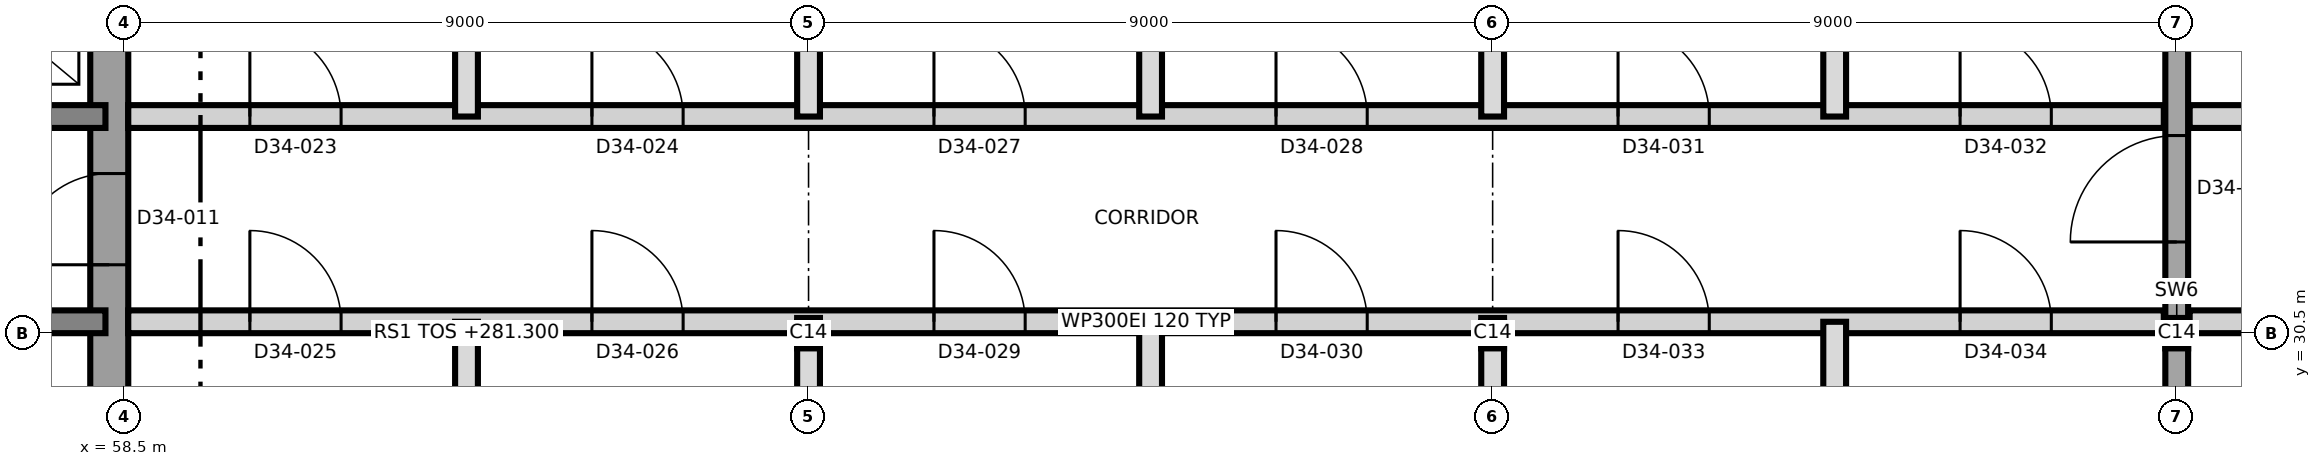
"""IFC4 building model, lengths in metres.
Left out: names, types, materials, properties, quantities, classifications, styles, units other than length and angle.
Written with IfcOpenShell. Run it as: python <this file> out.ifc"""

import sys

from ifc_helpers import new_model, si_unit, direction, frame, frame_2d, origin, origin_2d, place, context, subcontext, project, spatial, polyline, rectangle, i_section, outline, extrude, element, fill, save


model = new_model("IFC4")
c1 = context("Model", 3, precision=1e-05, world=origin(), true_north=direction((0.0, 1.0)))
c2 = subcontext(c1, "Body", "Model", "MODEL_VIEW")
j1 = project(units=[si_unit("LENGTHUNIT", "METRE"), si_unit("PLANEANGLEUNIT", "RADIAN")], contexts=[c1])
p1 = place(None, origin())
s1 = spatial("IfcSite", under=j1, at=p1, CompositionType="ELEMENT")
p2 = place(p1, origin())
s2 = spatial("IfcBuilding", under=s1, at=p2, CompositionType="ELEMENT")
p3 = place(p2, frame((0.0, 0.0, 281.3)))
s3 = spatial("IfcBuildingStorey", under=s2, at=p3, CompositionType="ELEMENT", Elevation=281.3)
p4 = place(p3, frame((58.3, 21.25, 0.0), z_axis=(0.0, 0.0, 1.0), x_axis=(0.0, 1.0, 0.0)))
e1 = element("IfcWall", 1, at=p4, inside=s3, PredefinedType="SHEAR", context=c2, shape_type="SweptSolid", body=[
    extrude(outline(polyline([(0.0, 0.0), (18.5, 0.0), (18.5, 2.12), (15.441, 4.2), (0.0, 4.2), (0.0, 0.0)])), frame((0.0, 0.25, 0.0), z_axis=(0.0, -1.0, 0.0), x_axis=(1.0, 0.0, 0.0)), (0.0, 0.0, 1.0), 0.5),
])
p5 = place(p4, frame((10.15, 0.0, 0.0)))
e2 = element("IfcOpeningElement", 2, at=p5, cuts=e1, PredefinedType="OPENING", context=c2, shape_type="SweptSolid", body=[
    extrude(rectangle(XDim=1.2, YDim=2.1, at=frame_2d((0.6, 1.05))), frame((0.0, 0.26, 0.0), z_axis=(0.0, -1.0, 0.0), x_axis=(1.0, 0.0, 0.0)), (0.0, 0.0, 1.0), 0.52),
])
p6 = place(p3, frame((31.75, 30.65, 0.0), z_axis=(0.0, 0.0, 1.0), x_axis=(1.0, 0.0, 0.0)))
e3 = element("IfcWall", 3, at=p6, inside=s3, PredefinedType="SHEAR", context=c2, shape_type="SweptSolid", body=[
    extrude(rectangle(XDim=26.5, YDim=0.3, at=frame_2d((13.25, 0.0))), origin(), (0.0, 0.0, 1.0), 4.2),
])
p7 = place(p6, frame((24.75, 0.0, 0.0)))
e4 = element("IfcOpeningElement", 4, at=p7, cuts=e3, PredefinedType="OPENING", context=c2, shape_type="SweptSolid", body=[
    extrude(rectangle(XDim=1.0, YDim=2.1, at=frame_2d((0.5, 1.05))), frame((0.0, 0.16, 0.0), z_axis=(0.0, -1.0, 0.0), x_axis=(1.0, 0.0, 0.0)), (0.0, 0.0, 1.0), 0.32),
])
p8 = place(p6, frame((4.05, 0.0, 0.0)))
e5 = element("IfcOpeningElement", 5, at=p8, cuts=e3, PredefinedType="OPENING", context=c2, shape_type="SweptSolid", body=[
    extrude(rectangle(XDim=1.0, YDim=2.1, at=frame_2d((0.5, 1.05))), frame((0.0, 0.16, 0.0), z_axis=(0.0, -1.0, 0.0), x_axis=(1.0, 0.0, 0.0)), (0.0, 0.0, 1.0), 0.32),
])
p9 = place(p6, frame((11.55, 0.0, 0.0)))
e6 = element("IfcOpeningElement", 6, at=p9, cuts=e3, PredefinedType="OPENING", context=c2, shape_type="SweptSolid", body=[
    extrude(rectangle(XDim=1.0, YDim=2.1, at=frame_2d((0.5, 1.05))), frame((0.0, 0.16, 0.0), z_axis=(0.0, -1.0, 0.0), x_axis=(1.0, 0.0, 0.0)), (0.0, 0.0, 1.0), 0.32),
])
p10 = place(p3, frame((31.75, 33.35, 0.0), z_axis=(0.0, 0.0, 1.0), x_axis=(1.0, 0.0, 0.0)))
e7 = element("IfcWall", 7, at=p10, inside=s3, PredefinedType="SHEAR", context=c2, shape_type="SweptSolid", body=[
    extrude(rectangle(XDim=26.5, YDim=0.3, at=frame_2d((13.25, 0.0))), origin(), (0.0, 0.0, 1.0), 4.2),
])
p11 = place(p10, frame((13.9, 0.0, 0.0)))
e8 = element("IfcOpeningElement", 8, at=p11, cuts=e7, PredefinedType="OPENING", context=c2, shape_type="SweptSolid", body=[
    extrude(rectangle(XDim=1.4, YDim=2.1, at=frame_2d((0.7, 1.05))), frame((0.0, 0.16, 0.0), z_axis=(0.0, -1.0, 0.0), x_axis=(1.0, 0.0, 0.0)), (0.0, 0.0, 1.0), 0.32),
])
p12 = place(p10, frame((5.375, 0.0, 0.0)))
e9 = element("IfcOpeningElement", 9, at=p12, cuts=e7, PredefinedType="OPENING", context=c2, shape_type="SweptSolid", body=[
    extrude(rectangle(XDim=1.2, YDim=2.1, at=frame_2d((0.6, 1.05))), frame((0.0, 0.16, 0.0), z_axis=(0.0, -1.0, 0.0), x_axis=(1.0, 0.0, 0.0)), (0.0, 0.0, 1.0), 0.32),
])
p13 = place(p10, frame((19.925, 0.0, 0.0)))
e10 = element("IfcOpeningElement", 10, at=p13, cuts=e7, PredefinedType="OPENING", context=c2, shape_type="SweptSolid", body=[
    extrude(rectangle(XDim=1.2, YDim=2.1, at=frame_2d((0.6, 1.05))), frame((0.0, 0.16, 0.0), z_axis=(0.0, -1.0, 0.0), x_axis=(1.0, 0.0, 0.0)), (0.0, 0.0, 1.0), 0.32),
])
p14 = place(p10, frame((9.8, 0.0, 0.0)))
e11 = element("IfcOpeningElement", 11, at=p14, cuts=e7, PredefinedType="OPENING", context=c2, shape_type="SweptSolid", body=[
    extrude(rectangle(XDim=0.9, YDim=2.1, at=frame_2d((0.45, 1.05))), frame((0.0, 0.16, 0.0), z_axis=(0.0, -1.0, 0.0), x_axis=(1.0, 0.0, 0.0)), (0.0, 0.0, 1.0), 0.32),
])
p15 = place(p3, frame((85.5, 20.35, 0.0), z_axis=(0.0, 0.0, 1.0), x_axis=(0.0, 1.0, 0.0)))
e12 = element("IfcWall", 12, at=p15, inside=s3, PredefinedType="SHEAR", context=c2, shape_type="SweptSolid", body=[
    extrude(outline(polyline([(0.0, 0.0), (20.3, 0.0), (20.3, 1.508), (16.341, 4.2), (0.0, 4.2), (0.0, 0.0)])), frame((0.0, 0.15, 0.0), z_axis=(0.0, -1.0, 0.0), x_axis=(1.0, 0.0, 0.0)), (0.0, 0.0, 1.0), 0.3),
])
p16 = place(p15, frame((11.35, 0.0, 0.0)))
e13 = element("IfcOpeningElement", 13, at=p16, cuts=e12, PredefinedType="OPENING", context=c2, shape_type="SweptSolid", body=[
    extrude(rectangle(XDim=1.4, YDim=2.1, at=frame_2d((0.7, 1.05))), frame((0.0, 0.16, 0.0), z_axis=(0.0, -1.0, 0.0), x_axis=(1.0, 0.0, 0.0)), (0.0, 0.0, 1.0), 0.32),
])
for number, where, z_axis, x_axis in (
    (14, (67.5, 30.5, 0.0), (0.0, 0.0, 1.0), (1.0, 0.0, 0.0)),
    (15, (76.5, 30.5, 0.0), (0.0, 0.0, 1.0), (1.0, 0.0, 0.0)),
    (16, (85.5, 30.5, 0.0), (0.0, 0.0, 1.0), (1.0, 0.0, 0.0)),
):
    element("IfcColumn", number, at=place(p3, frame(where, z_axis=z_axis, x_axis=x_axis)), inside=s3, PredefinedType="COLUMN", context=c2, shape_type="SweptSolid", body=[
        extrude(i_section(OverallWidth=0.3, OverallDepth=0.4, WebThickness=0.013, FlangeThickness=0.024, FilletRadius=0.027, at=origin_2d()), origin(), (0.0, 0.0, 1.0), 4.2),
    ])
p17 = place(p3, frame((58.55, 30.65, 0.0), z_axis=(0.0, 0.0, 1.0), x_axis=(1.0, 0.0, 0.0)))
e17 = element("IfcWall", 17, at=p17, inside=s3, PredefinedType="PARTITIONING", context=c2, shape_type="SweptSolid", body=[
    extrude(rectangle(XDim=26.78, YDim=0.3, at=frame_2d((13.39, 0.0))), origin(), (0.0, 0.0, 1.0), 3.9),
])
p18 = place(p17, frame((1.6, 0.0, 0.0)))
e18 = element("IfcOpeningElement", 18, at=p18, cuts=e17, PredefinedType="OPENING", context=c2, shape_type="SweptSolid", body=[
    extrude(rectangle(XDim=1.2, YDim=2.1, at=frame_2d((0.6, 1.05))), frame((0.0, 0.16, 0.0), z_axis=(0.0, -1.0, 0.0), x_axis=(1.0, 0.0, 0.0)), (0.0, 0.0, 1.0), 0.32),
])
p19 = place(p17, frame((6.1, 0.0, 0.0)))
e19 = element("IfcOpeningElement", 19, at=p19, cuts=e17, PredefinedType="OPENING", context=c2, shape_type="SweptSolid", body=[
    extrude(rectangle(XDim=1.2, YDim=2.1, at=frame_2d((0.6, 1.05))), frame((0.0, 0.16, 0.0), z_axis=(0.0, -1.0, 0.0), x_axis=(1.0, 0.0, 0.0)), (0.0, 0.0, 1.0), 0.32),
])
p20 = place(p17, frame((10.6, 0.0, 0.0)))
e20 = element("IfcOpeningElement", 20, at=p20, cuts=e17, PredefinedType="OPENING", context=c2, shape_type="SweptSolid", body=[
    extrude(rectangle(XDim=1.2, YDim=2.1, at=frame_2d((0.6, 1.05))), frame((0.0, 0.16, 0.0), z_axis=(0.0, -1.0, 0.0), x_axis=(1.0, 0.0, 0.0)), (0.0, 0.0, 1.0), 0.32),
])
p21 = place(p17, frame((15.1, 0.0, 0.0)))
e21 = element("IfcOpeningElement", 21, at=p21, cuts=e17, PredefinedType="OPENING", context=c2, shape_type="SweptSolid", body=[
    extrude(rectangle(XDim=1.2, YDim=2.1, at=frame_2d((0.6, 1.05))), frame((0.0, 0.16, 0.0), z_axis=(0.0, -1.0, 0.0), x_axis=(1.0, 0.0, 0.0)), (0.0, 0.0, 1.0), 0.32),
])
p22 = place(p17, frame((19.6, 0.0, 0.0)))
e22 = element("IfcOpeningElement", 22, at=p22, cuts=e17, PredefinedType="OPENING", context=c2, shape_type="SweptSolid", body=[
    extrude(rectangle(XDim=1.2, YDim=2.1, at=frame_2d((0.6, 1.05))), frame((0.0, 0.16, 0.0), z_axis=(0.0, -1.0, 0.0), x_axis=(1.0, 0.0, 0.0)), (0.0, 0.0, 1.0), 0.32),
])
p23 = place(p17, frame((24.1, 0.0, 0.0)))
e23 = element("IfcOpeningElement", 23, at=p23, cuts=e17, PredefinedType="OPENING", context=c2, shape_type="SweptSolid", body=[
    extrude(rectangle(XDim=1.2, YDim=2.1, at=frame_2d((0.6, 1.05))), frame((0.0, 0.16, 0.0), z_axis=(0.0, -1.0, 0.0), x_axis=(1.0, 0.0, 0.0)), (0.0, 0.0, 1.0), 0.32),
])
p24 = place(p3, frame((85.67, 30.65, 0.0), z_axis=(0.0, 0.0, 1.0), x_axis=(1.0, 0.0, 0.0)))
e24 = element("IfcWall", 24, at=p24, inside=s3, PredefinedType="PARTITIONING", context=c2, shape_type="SweptSolid", body=[
    extrude(rectangle(XDim=9.58, YDim=0.3, at=frame_2d((4.79, 0.0))), origin(), (0.0, 0.0, 1.0), 3.9),
])
p25 = place(p24, frame((2.23, 0.0, 0.0)))
e25 = element("IfcOpeningElement", 25, at=p25, cuts=e24, PredefinedType="OPENING", context=c2, shape_type="SweptSolid", body=[
    extrude(rectangle(XDim=0.9, YDim=2.1, at=frame_2d((0.45, 1.05))), frame((0.0, 0.16, 0.0), z_axis=(0.0, -1.0, 0.0), x_axis=(1.0, 0.0, 0.0)), (0.0, 0.0, 1.0), 0.32),
])
p26 = place(p24, frame((5.63, 0.0, 0.0)))
e26 = element("IfcOpeningElement", 26, at=p26, cuts=e24, PredefinedType="OPENING", context=c2, shape_type="SweptSolid", body=[
    extrude(rectangle(XDim=1.0, YDim=2.1, at=frame_2d((0.5, 1.05))), frame((0.0, 0.16, 0.0), z_axis=(0.0, -1.0, 0.0), x_axis=(1.0, 0.0, 0.0)), (0.0, 0.0, 1.0), 0.32),
])
p27 = place(p3, frame((58.55, 33.35, 0.0), z_axis=(0.0, 0.0, 1.0), x_axis=(1.0, 0.0, 0.0)))
e27 = element("IfcWall", 27, at=p27, inside=s3, PredefinedType="PARTITIONING", context=c2, shape_type="SweptSolid", body=[
    extrude(rectangle(XDim=26.78, YDim=0.3, at=frame_2d((13.39, 0.0))), origin(), (0.0, 0.0, 1.0), 3.9),
])
p28 = place(p27, frame((1.6, 0.0, 0.0)))
e28 = element("IfcOpeningElement", 28, at=p28, cuts=e27, PredefinedType="OPENING", context=c2, shape_type="SweptSolid", body=[
    extrude(rectangle(XDim=1.2, YDim=2.1, at=frame_2d((0.6, 1.05))), frame((0.0, 0.16, 0.0), z_axis=(0.0, -1.0, 0.0), x_axis=(1.0, 0.0, 0.0)), (0.0, 0.0, 1.0), 0.32),
])
p29 = place(p27, frame((6.1, 0.0, 0.0)))
e29 = element("IfcOpeningElement", 29, at=p29, cuts=e27, PredefinedType="OPENING", context=c2, shape_type="SweptSolid", body=[
    extrude(rectangle(XDim=1.2, YDim=2.1, at=frame_2d((0.6, 1.05))), frame((0.0, 0.16, 0.0), z_axis=(0.0, -1.0, 0.0), x_axis=(1.0, 0.0, 0.0)), (0.0, 0.0, 1.0), 0.32),
])
p30 = place(p27, frame((10.6, 0.0, 0.0)))
e30 = element("IfcOpeningElement", 30, at=p30, cuts=e27, PredefinedType="OPENING", context=c2, shape_type="SweptSolid", body=[
    extrude(rectangle(XDim=1.2, YDim=2.1, at=frame_2d((0.6, 1.05))), frame((0.0, 0.16, 0.0), z_axis=(0.0, -1.0, 0.0), x_axis=(1.0, 0.0, 0.0)), (0.0, 0.0, 1.0), 0.32),
])
p31 = place(p27, frame((15.1, 0.0, 0.0)))
e31 = element("IfcOpeningElement", 31, at=p31, cuts=e27, PredefinedType="OPENING", context=c2, shape_type="SweptSolid", body=[
    extrude(rectangle(XDim=1.2, YDim=2.1, at=frame_2d((0.6, 1.05))), frame((0.0, 0.16, 0.0), z_axis=(0.0, -1.0, 0.0), x_axis=(1.0, 0.0, 0.0)), (0.0, 0.0, 1.0), 0.32),
])
p32 = place(p27, frame((19.6, 0.0, 0.0)))
e32 = element("IfcOpeningElement", 32, at=p32, cuts=e27, PredefinedType="OPENING", context=c2, shape_type="SweptSolid", body=[
    extrude(rectangle(XDim=1.2, YDim=2.1, at=frame_2d((0.6, 1.05))), frame((0.0, 0.16, 0.0), z_axis=(0.0, -1.0, 0.0), x_axis=(1.0, 0.0, 0.0)), (0.0, 0.0, 1.0), 0.32),
])
p33 = place(p27, frame((24.1, 0.0, 0.0)))
e33 = element("IfcOpeningElement", 33, at=p33, cuts=e27, PredefinedType="OPENING", context=c2, shape_type="SweptSolid", body=[
    extrude(rectangle(XDim=1.2, YDim=2.1, at=frame_2d((0.6, 1.05))), frame((0.0, 0.16, 0.0), z_axis=(0.0, -1.0, 0.0), x_axis=(1.0, 0.0, 0.0)), (0.0, 0.0, 1.0), 0.32),
])
p34 = place(p3, frame((85.67, 33.35, 0.0), z_axis=(0.0, 0.0, 1.0), x_axis=(1.0, 0.0, 0.0)))
e34 = element("IfcWall", 34, at=p34, inside=s3, PredefinedType="PARTITIONING", context=c2, shape_type="SweptSolid", body=[
    extrude(rectangle(XDim=9.705, YDim=0.3, at=frame_2d((4.853, 0.0))), origin(), (0.0, 0.0, 1.0), 3.9),
])
p35 = place(p34, frame((1.83, 0.0, 0.0)))
e35 = element("IfcOpeningElement", 35, at=p35, cuts=e34, PredefinedType="OPENING", context=c2, shape_type="SweptSolid", body=[
    extrude(rectangle(XDim=1.0, YDim=2.1, at=frame_2d((0.5, 1.05))), frame((0.0, 0.16, 0.0), z_axis=(0.0, -1.0, 0.0), x_axis=(1.0, 0.0, 0.0)), (0.0, 0.0, 1.0), 0.32),
])
p36 = place(p34, frame((5.63, 0.0, 0.0)))
e36 = element("IfcOpeningElement", 36, at=p36, cuts=e34, PredefinedType="OPENING", context=c2, shape_type="SweptSolid", body=[
    extrude(rectangle(XDim=1.0, YDim=2.1, at=frame_2d((0.5, 1.05))), frame((0.0, 0.16, 0.0), z_axis=(0.0, -1.0, 0.0), x_axis=(1.0, 0.0, 0.0)), (0.0, 0.0, 1.0), 0.32),
])
p37 = place(p3, frame((63.0, 20.17, 0.0), z_axis=(0.0, 0.0, 1.0), x_axis=(0.0, 1.0, 0.0)))
e37 = element("IfcWall", 37, at=p37, inside=s3, PredefinedType="PARTITIONING", context=c2, shape_type="SweptSolid", body=[
    extrude(rectangle(XDim=10.48, YDim=0.3, at=frame_2d((5.24, 0.0))), origin(), (0.0, 0.0, 1.0), 3.9),
])
p38 = place(p3, frame((63.0, 33.35, 0.0), z_axis=(0.0, 0.0, 1.0), x_axis=(0.0, 1.0, 0.0)))
e38 = element("IfcWall", 38, at=p38, inside=s3, PredefinedType="PARTITIONING", context=c2, shape_type="SweptSolid", body=[
    extrude(rectangle(XDim=5.75, YDim=0.3, at=frame_2d((2.875, 0.0))), origin(), (0.0, 0.0, 1.0), 3.85),
])
p39 = place(p3, frame((67.5, 20.17, 0.0), z_axis=(0.0, 0.0, 1.0), x_axis=(0.0, 1.0, 0.0)))
e39 = element("IfcWall", 39, at=p39, inside=s3, PredefinedType="PARTITIONING", context=c2, shape_type="SweptSolid", body=[
    extrude(rectangle(XDim=10.48, YDim=0.3, at=frame_2d((5.24, 0.0))), origin(), (0.0, 0.0, 1.0), 3.9),
])
p40 = place(p3, frame((67.5, 33.35, 0.0), z_axis=(0.0, 0.0, 1.0), x_axis=(0.0, 1.0, 0.0)))
e40 = element("IfcWall", 40, at=p40, inside=s3, PredefinedType="PARTITIONING", context=c2, shape_type="SweptSolid", body=[
    extrude(rectangle(XDim=5.75, YDim=0.3, at=frame_2d((2.875, 0.0))), origin(), (0.0, 0.0, 1.0), 3.85),
])
p41 = place(p3, frame((72.0, 20.17, 0.0), z_axis=(0.0, 0.0, 1.0), x_axis=(0.0, 1.0, 0.0)))
e41 = element("IfcWall", 41, at=p41, inside=s3, PredefinedType="PARTITIONING", context=c2, shape_type="SweptSolid", body=[
    extrude(rectangle(XDim=10.48, YDim=0.3, at=frame_2d((5.24, 0.0))), origin(), (0.0, 0.0, 1.0), 3.9),
])
p42 = place(p3, frame((72.0, 33.35, 0.0), z_axis=(0.0, 0.0, 1.0), x_axis=(0.0, 1.0, 0.0)))
e42 = element("IfcWall", 42, at=p42, inside=s3, PredefinedType="PARTITIONING", context=c2, shape_type="SweptSolid", body=[
    extrude(rectangle(XDim=5.75, YDim=0.3, at=frame_2d((2.875, 0.0))), origin(), (0.0, 0.0, 1.0), 3.85),
])
p43 = place(p3, frame((76.5, 20.17, 0.0), z_axis=(0.0, 0.0, 1.0), x_axis=(0.0, 1.0, 0.0)))
e43 = element("IfcWall", 43, at=p43, inside=s3, PredefinedType="PARTITIONING", context=c2, shape_type="SweptSolid", body=[
    extrude(rectangle(XDim=10.48, YDim=0.3, at=frame_2d((5.24, 0.0))), origin(), (0.0, 0.0, 1.0), 3.9),
])
p44 = place(p3, frame((76.5, 33.35, 0.0), z_axis=(0.0, 0.0, 1.0), x_axis=(0.0, 1.0, 0.0)))
e44 = element("IfcWall", 44, at=p44, inside=s3, PredefinedType="PARTITIONING", context=c2, shape_type="SweptSolid", body=[
    extrude(rectangle(XDim=5.75, YDim=0.3, at=frame_2d((2.875, 0.0))), origin(), (0.0, 0.0, 1.0), 3.85),
])
p45 = place(p3, frame((81.0, 20.17, 0.0), z_axis=(0.0, 0.0, 1.0), x_axis=(0.0, 1.0, 0.0)))
e45 = element("IfcWall", 45, at=p45, inside=s3, PredefinedType="PARTITIONING", context=c2, shape_type="SweptSolid", body=[
    extrude(rectangle(XDim=10.48, YDim=0.3, at=frame_2d((5.24, 0.0))), origin(), (0.0, 0.0, 1.0), 3.9),
])
p46 = place(p3, frame((81.0, 33.35, 0.0), z_axis=(0.0, 0.0, 1.0), x_axis=(0.0, 1.0, 0.0)))
e46 = element("IfcWall", 46, at=p46, inside=s3, PredefinedType="PARTITIONING", context=c2, shape_type="SweptSolid", body=[
    extrude(rectangle(XDim=5.75, YDim=0.3, at=frame_2d((2.875, 0.0))), origin(), (0.0, 0.0, 1.0), 3.85),
])
p47 = place(p5, origin())
e47 = element("IfcDoor", 47, at=p47, inside=s3, OperationType="SINGLE_SWING_LEFT", PredefinedType="DOOR", context=c2, shape_type="SweptSolid", body=[
    extrude(rectangle(XDim=1.2, YDim=2.1, at=frame_2d((0.6, 1.05))), frame((0.0, 0.025, 0.0), z_axis=(0.0, -1.0, 0.0), x_axis=(1.0, 0.0, 0.0)), (0.0, 0.0, 1.0), 0.05),
])
fill(e2, e47)
p48 = place(p28, origin())
e48 = element("IfcDoor", 48, at=p48, inside=s3, OperationType="SINGLE_SWING_LEFT", PredefinedType="DOOR", context=c2, shape_type="SweptSolid", body=[
    extrude(rectangle(XDim=1.2, YDim=2.1, at=frame_2d((0.6, 1.05))), frame((0.0, 0.025, 0.0), z_axis=(0.0, -1.0, 0.0), x_axis=(1.0, 0.0, 0.0)), (0.0, 0.0, 1.0), 0.05),
])
fill(e28, e48)
p49 = place(p29, origin())
e49 = element("IfcDoor", 49, at=p49, inside=s3, OperationType="SINGLE_SWING_LEFT", PredefinedType="DOOR", context=c2, shape_type="SweptSolid", body=[
    extrude(rectangle(XDim=1.2, YDim=2.1, at=frame_2d((0.6, 1.05))), frame((0.0, 0.025, 0.0), z_axis=(0.0, -1.0, 0.0), x_axis=(1.0, 0.0, 0.0)), (0.0, 0.0, 1.0), 0.05),
])
fill(e29, e49)
p50 = place(p18, origin())
e50 = element("IfcDoor", 50, at=p50, inside=s3, OperationType="SINGLE_SWING_RIGHT", PredefinedType="DOOR", context=c2, shape_type="SweptSolid", body=[
    extrude(rectangle(XDim=1.2, YDim=2.1, at=frame_2d((0.6, 1.05))), frame((0.0, 0.025, 0.0), z_axis=(0.0, -1.0, 0.0), x_axis=(1.0, 0.0, 0.0)), (0.0, 0.0, 1.0), 0.05),
])
fill(e18, e50)
p51 = place(p19, origin())
e51 = element("IfcDoor", 51, at=p51, inside=s3, OperationType="SINGLE_SWING_LEFT", PredefinedType="DOOR", context=c2, shape_type="SweptSolid", body=[
    extrude(rectangle(XDim=1.2, YDim=2.1, at=frame_2d((0.6, 1.05))), frame((0.0, 0.025, 0.0), z_axis=(0.0, -1.0, 0.0), x_axis=(1.0, 0.0, 0.0)), (0.0, 0.0, 1.0), 0.05),
])
fill(e19, e51)
p52 = place(p30, origin())
e52 = element("IfcDoor", 52, at=p52, inside=s3, OperationType="SINGLE_SWING_LEFT", PredefinedType="DOOR", context=c2, shape_type="SweptSolid", body=[
    extrude(rectangle(XDim=1.2, YDim=2.1, at=frame_2d((0.6, 1.05))), frame((0.0, 0.025, 0.0), z_axis=(0.0, -1.0, 0.0), x_axis=(1.0, 0.0, 0.0)), (0.0, 0.0, 1.0), 0.05),
])
fill(e30, e52)
p53 = place(p31, origin())
e53 = element("IfcDoor", 53, at=p53, inside=s3, OperationType="SINGLE_SWING_RIGHT", PredefinedType="DOOR", context=c2, shape_type="SweptSolid", body=[
    extrude(rectangle(XDim=1.2, YDim=2.1, at=frame_2d((0.6, 1.05))), frame((0.0, 0.025, 0.0), z_axis=(0.0, -1.0, 0.0), x_axis=(1.0, 0.0, 0.0)), (0.0, 0.0, 1.0), 0.05),
])
fill(e31, e53)
p54 = place(p20, origin())
e54 = element("IfcDoor", 54, at=p54, inside=s3, OperationType="SINGLE_SWING_LEFT", PredefinedType="DOOR", context=c2, shape_type="SweptSolid", body=[
    extrude(rectangle(XDim=1.2, YDim=2.1, at=frame_2d((0.6, 1.05))), frame((0.0, 0.025, 0.0), z_axis=(0.0, -1.0, 0.0), x_axis=(1.0, 0.0, 0.0)), (0.0, 0.0, 1.0), 0.05),
])
fill(e20, e54)
p55 = place(p21, origin())
e55 = element("IfcDoor", 55, at=p55, inside=s3, OperationType="SINGLE_SWING_LEFT", PredefinedType="DOOR", context=c2, shape_type="SweptSolid", body=[
    extrude(rectangle(XDim=1.2, YDim=2.1, at=frame_2d((0.6, 1.05))), frame((0.0, 0.025, 0.0), z_axis=(0.0, -1.0, 0.0), x_axis=(1.0, 0.0, 0.0)), (0.0, 0.0, 1.0), 0.05),
])
fill(e21, e55)
p56 = place(p32, origin())
e56 = element("IfcDoor", 56, at=p56, inside=s3, OperationType="SINGLE_SWING_RIGHT", PredefinedType="DOOR", context=c2, shape_type="SweptSolid", body=[
    extrude(rectangle(XDim=1.2, YDim=2.1, at=frame_2d((0.6, 1.05))), frame((0.0, 0.025, 0.0), z_axis=(0.0, -1.0, 0.0), x_axis=(1.0, 0.0, 0.0)), (0.0, 0.0, 1.0), 0.05),
])
fill(e32, e56)
p57 = place(p33, origin())
e57 = element("IfcDoor", 57, at=p57, inside=s3, OperationType="SINGLE_SWING_LEFT", PredefinedType="DOOR", context=c2, shape_type="SweptSolid", body=[
    extrude(rectangle(XDim=1.2, YDim=2.1, at=frame_2d((0.6, 1.05))), frame((0.0, 0.025, 0.0), z_axis=(0.0, -1.0, 0.0), x_axis=(1.0, 0.0, 0.0)), (0.0, 0.0, 1.0), 0.05),
])
fill(e33, e57)
p58 = place(p22, origin())
e58 = element("IfcDoor", 58, at=p58, inside=s3, OperationType="SINGLE_SWING_LEFT", PredefinedType="DOOR", context=c2, shape_type="SweptSolid", body=[
    extrude(rectangle(XDim=1.2, YDim=2.1, at=frame_2d((0.6, 1.05))), frame((0.0, 0.025, 0.0), z_axis=(0.0, -1.0, 0.0), x_axis=(1.0, 0.0, 0.0)), (0.0, 0.0, 1.0), 0.05),
])
fill(e22, e58)
p59 = place(p23, origin())
e59 = element("IfcDoor", 59, at=p59, inside=s3, OperationType="SINGLE_SWING_RIGHT", PredefinedType="DOOR", context=c2, shape_type="SweptSolid", body=[
    extrude(rectangle(XDim=1.2, YDim=2.1, at=frame_2d((0.6, 1.05))), frame((0.0, 0.025, 0.0), z_axis=(0.0, -1.0, 0.0), x_axis=(1.0, 0.0, 0.0)), (0.0, 0.0, 1.0), 0.05),
])
fill(e23, e59)
p60 = place(p16, origin())
e60 = element("IfcDoor", 60, at=p60, inside=s3, OperationType="SINGLE_SWING_RIGHT", PredefinedType="DOOR", context=c2, shape_type="SweptSolid", body=[
    extrude(rectangle(XDim=1.4, YDim=2.1, at=frame_2d((0.7, 1.05))), frame((0.0, 0.025, 0.0), z_axis=(0.0, -1.0, 0.0), x_axis=(1.0, 0.0, 0.0)), (0.0, 0.0, 1.0), 0.05),
])
fill(e13, e60)
save(model, sys.argv[1])
